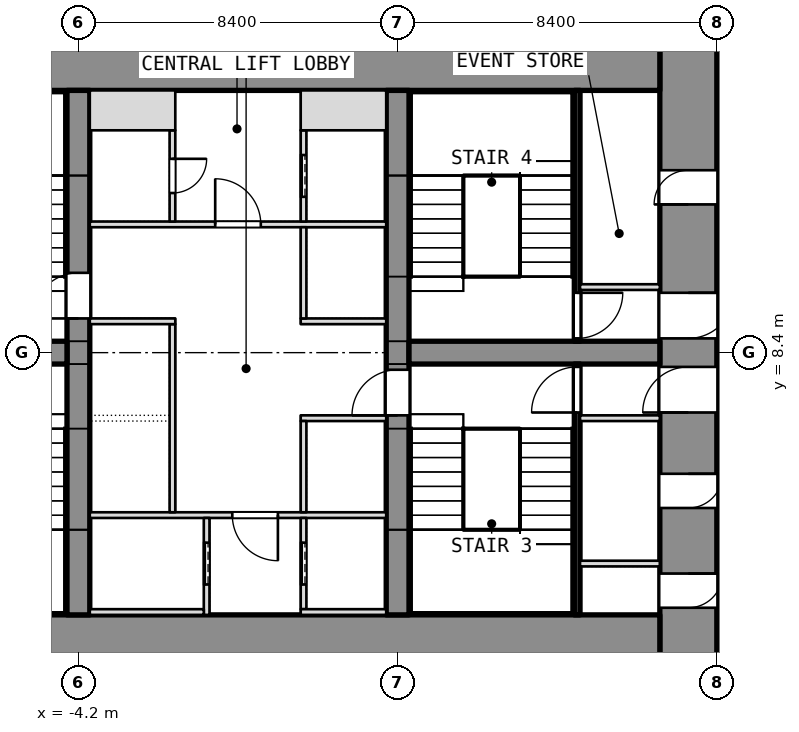
"""IFC4 building model, lengths in metres.
Left out: names, types, materials, properties, quantities, classifications, styles, units other than length and angle.
Written with IfcOpenShell. Run it as: python <this file> out.ifc"""

import sys

from ifc_helpers import new_model, si_unit, direction, frame, frame_2d, origin, place, context, subcontext, project, spatial, rectangle, extrude, element, fill, save


model = new_model("IFC4")
c1 = context("Model", 3, precision=1e-05, world=origin(), true_north=direction((0.0, 1.0)))
c2 = subcontext(c1, "Body", "Model", "MODEL_VIEW")
j1 = project(units=[si_unit("LENGTHUNIT", "METRE"), si_unit("PLANEANGLEUNIT", "RADIAN")], contexts=[c1])
p1 = place(None, origin())
s1 = spatial("IfcSite", under=j1, at=p1, CompositionType="ELEMENT")
p2 = place(p1, origin())
s2 = spatial("IfcBuilding", under=s1, at=p2, CompositionType="ELEMENT")
p3 = place(p2, frame((0.0, 0.0, 26.0)))
s3 = spatial("IfcBuildingStorey", under=s2, at=p3, CompositionType="ELEMENT", Elevation=26.0)
p4 = place(p3, frame((11.85, 0.0, 0.0), z_axis=(0.0, 0.0, 1.0), x_axis=(0.0, 1.0, 0.0)))
e1 = element("IfcWall", 1, at=p4, inside=s3, PredefinedType="SHEAR", context=c2, shape_type="SweptSolid", body=[
    extrude(rectangle(XDim=16.8, YDim=1.5, at=frame_2d((8.4, 0.0))), origin(), (0.0, 0.0, 1.0), 5.0),
])
p5 = place(p4, frame((1.688, 0.0, 0.0)))
e2 = element("IfcOpeningElement", 2, at=p5, cuts=e1, PredefinedType="OPENING", context=c2, shape_type="SweptSolid", body=[
    extrude(rectangle(XDim=0.9, YDim=2.1, at=frame_2d((0.45, 1.05))), frame((0.0, 0.75, 0.0), z_axis=(0.0, -1.0, 0.0), x_axis=(1.0, 0.0, 0.0)), (0.0, 0.0, 1.0), 1.5),
])
p6 = place(p4, frame((4.312, 0.0, 0.0)))
e3 = element("IfcOpeningElement", 3, at=p6, cuts=e1, PredefinedType="OPENING", context=c2, shape_type="SweptSolid", body=[
    extrude(rectangle(XDim=0.9, YDim=2.1, at=frame_2d((0.45, 1.05))), frame((0.0, 0.75, 0.0), z_axis=(0.0, -1.0, 0.0), x_axis=(1.0, 0.0, 0.0)), (0.0, 0.0, 1.0), 1.5),
])
p7 = place(p4, frame((6.825, 0.0, 0.0)))
e4 = element("IfcOpeningElement", 4, at=p7, cuts=e1, PredefinedType="OPENING", context=c2, shape_type="SweptSolid", body=[
    extrude(rectangle(XDim=1.2, YDim=2.1, at=frame_2d((0.6, 1.05))), frame((0.0, 0.75, 0.0), z_axis=(0.0, -1.0, 0.0), x_axis=(1.0, 0.0, 0.0)), (0.0, 0.0, 1.0), 1.5),
])
p8 = place(p4, frame((12.3, 0.0, 0.0)))
e5 = element("IfcOpeningElement", 5, at=p8, cuts=e1, PredefinedType="OPENING", context=c2, shape_type="SweptSolid", body=[
    extrude(rectangle(XDim=0.9, YDim=2.1, at=frame_2d((0.45, 1.05))), frame((0.0, 0.75, 0.0), z_axis=(0.0, -1.0, 0.0), x_axis=(1.0, 0.0, 0.0)), (0.0, 0.0, 1.0), 1.5),
])
p9 = place(p4, frame((8.775, 0.0, 0.0)))
e6 = element("IfcOpeningElement", 6, at=p9, cuts=e1, PredefinedType="OPENING", context=c2, shape_type="SweptSolid", body=[
    extrude(rectangle(XDim=1.2, YDim=2.1, at=frame_2d((0.6, 1.05))), frame((0.0, 0.75, 0.0), z_axis=(0.0, -1.0, 0.0), x_axis=(1.0, 0.0, 0.0)), (0.0, 0.0, 1.0), 1.5),
])
for number, where, z_axis, x_axis in (
    (7, (-11.1, 0.75, 0.0), (0.0, 0.0, 1.0), (1.0, 0.0, 0.0)),
    (8, (-11.1, 16.05, 0.0), (0.0, 0.0, 1.0), (1.0, 0.0, 0.0)),
):
    element("IfcWall", number, at=place(p3, frame(where, z_axis=z_axis, x_axis=x_axis)), inside=s3, PredefinedType="SHEAR", context=c2, shape_type="SweptSolid", body=[
        extrude(rectangle(XDim=22.2, YDim=1.5, at=frame_2d((11.1, 0.0))), origin(), (0.0, 0.0, 1.0), 5.0),
    ])
p10 = place(p3, frame((-4.2, 1.5, 0.0), z_axis=(0.0, 0.0, 1.0), x_axis=(0.0, 1.0, 0.0)))
e9 = element("IfcWall", 9, at=p10, inside=s3, PredefinedType="SHEAR", context=c2, shape_type="SweptSolid", body=[
    extrude(rectangle(XDim=13.8, YDim=0.6, at=frame_2d((6.9, 0.0))), origin(), (0.0, 0.0, 1.0), 5.0),
])
p11 = place(p10, frame((7.8, 0.0, 0.0)))
e10 = element("IfcOpeningElement", 10, at=p11, cuts=e9, PredefinedType="OPENING", context=c2, shape_type="SweptSolid", body=[
    extrude(rectangle(XDim=1.2, YDim=2.1, at=frame_2d((0.6, 1.05))), frame((0.0, 0.3, 0.0), z_axis=(0.0, -1.0, 0.0), x_axis=(1.0, 0.0, 0.0)), (0.0, 0.0, 1.0), 0.6),
])
p12 = place(p3, frame((4.2, 1.5, 0.0), z_axis=(0.0, 0.0, 1.0), x_axis=(0.0, 1.0, 0.0)))
e11 = element("IfcWall", 11, at=p12, inside=s3, PredefinedType="SHEAR", context=c2, shape_type="SweptSolid", body=[
    extrude(rectangle(XDim=13.8, YDim=0.6, at=frame_2d((6.9, 0.0))), origin(), (0.0, 0.0, 1.0), 5.0),
])
p13 = place(p12, frame((5.25, 0.0, 0.0)))
e12 = element("IfcOpeningElement", 12, at=p13, cuts=e11, PredefinedType="OPENING", context=c2, shape_type="SweptSolid", body=[
    extrude(rectangle(XDim=1.2, YDim=2.1, at=frame_2d((0.6, 1.05))), frame((0.0, 0.3, 0.0), z_axis=(0.0, -1.0, 0.0), x_axis=(1.0, 0.0, 0.0)), (0.0, 0.0, 1.0), 0.6),
])
for number, where, z_axis, x_axis in (
    (13, (-11.1, 8.4, 0.0), (0.0, 0.0, 1.0), (1.0, 0.0, 0.0)),
    (14, (4.5, 8.4, 0.0), (0.0, 0.0, 1.0), (1.0, 0.0, 0.0)),
):
    element("IfcWall", number, at=place(p3, frame(where, z_axis=z_axis, x_axis=x_axis)), inside=s3, PredefinedType="SHEAR", context=c2, shape_type="SweptSolid", body=[
        extrude(rectangle(XDim=6.6, YDim=0.6, at=frame_2d((3.3, 0.0))), origin(), (0.0, 0.0, 1.0), 5.0),
    ])
p14 = place(p3, frame((8.925, 1.5, 0.0), z_axis=(0.0, 0.0, 1.0), x_axis=(0.0, 1.0, 0.0)))
e15 = element("IfcWall", 15, at=p14, inside=s3, PredefinedType="SHEAR", context=c2, shape_type="SweptSolid", body=[
    extrude(rectangle(XDim=6.6, YDim=0.15, at=frame_2d((3.3, 0.0))), origin(), (0.0, 0.0, 1.0), 4.8),
])
p15 = place(p14, frame((5.325, 0.0, 0.0)))
e16 = element("IfcOpeningElement", 16, at=p15, cuts=e15, PredefinedType="OPENING", context=c2, shape_type="SweptSolid", body=[
    extrude(rectangle(XDim=1.2, YDim=2.1, at=frame_2d((0.6, 1.05))), frame((0.0, 0.075, 0.0), z_axis=(0.0, -1.0, 0.0), x_axis=(1.0, 0.0, 0.0)), (0.0, 0.0, 1.0), 0.15),
])
for number, where, z_axis, x_axis in (
    (17, (9.0, 6.675, 0.0), (0.0, 0.0, 1.0), (1.0, 0.0, 0.0)),
    (18, (9.0, 2.85, 0.0), (0.0, 0.0, 1.0), (1.0, 0.0, 0.0)),
):
    element("IfcWall", number, at=place(p3, frame(where, z_axis=z_axis, x_axis=x_axis)), inside=s3, PredefinedType="PARTITIONING", context=c2, shape_type="SweptSolid", body=[
        extrude(rectangle(XDim=2.1, YDim=0.15, at=frame_2d((1.05, 0.0))), origin(), (0.0, 0.0, 1.0), 4.8),
    ])
p16 = place(p3, frame((8.925, 8.7, 0.0), z_axis=(0.0, 0.0, 1.0), x_axis=(0.0, 1.0, 0.0)))
e19 = element("IfcWall", 19, at=p16, inside=s3, PredefinedType="SHEAR", context=c2, shape_type="SweptSolid", body=[
    extrude(rectangle(XDim=6.6, YDim=0.15, at=frame_2d((3.3, 0.0))), origin(), (0.0, 0.0, 1.0), 4.8),
])
p17 = place(p16, frame((0.075, 0.0, 0.0)))
e20 = element("IfcOpeningElement", 20, at=p17, cuts=e19, PredefinedType="OPENING", context=c2, shape_type="SweptSolid", body=[
    extrude(rectangle(XDim=1.2, YDim=2.1, at=frame_2d((0.6, 1.05))), frame((0.0, 0.075, 0.0), z_axis=(0.0, -1.0, 0.0), x_axis=(1.0, 0.0, 0.0)), (0.0, 0.0, 1.0), 0.15),
])
p18 = place(p3, frame((9.0, 10.125, 0.0), z_axis=(0.0, 0.0, 1.0), x_axis=(1.0, 0.0, 0.0)))
e21 = element("IfcWall", 21, at=p18, inside=s3, PredefinedType="PARTITIONING", context=c2, shape_type="SweptSolid", body=[
    extrude(rectangle(XDim=2.1, YDim=0.15, at=frame_2d((1.05, 0.0))), origin(), (0.0, 0.0, 1.0), 4.8),
])
p19 = place(p3, frame((-3.9, 4.125, 0.0), z_axis=(0.0, 0.0, 1.0), x_axis=(1.0, 0.0, 0.0)))
e22 = element("IfcWall", 22, at=p19, inside=s3, PredefinedType="PARTITIONING", context=c2, shape_type="SweptSolid", body=[
    extrude(rectangle(XDim=7.8, YDim=0.15, at=frame_2d((3.9, 0.0))), origin(), (0.0, 0.0, 1.0), 4.8),
])
p20 = place(p19, frame((3.75, 0.0, 0.0)))
e23 = element("IfcOpeningElement", 23, at=p20, cuts=e22, PredefinedType="OPENING", context=c2, shape_type="SweptSolid", body=[
    extrude(rectangle(XDim=1.2, YDim=2.1, at=frame_2d((0.6, 1.05))), frame((0.0, 0.075, 0.0), z_axis=(0.0, -1.0, 0.0), x_axis=(1.0, 0.0, 0.0)), (0.0, 0.0, 1.0), 0.15),
])
p21 = place(p3, frame((-3.9, 11.775, 0.0), z_axis=(0.0, 0.0, 1.0), x_axis=(1.0, 0.0, 0.0)))
e24 = element("IfcWall", 24, at=p21, inside=s3, PredefinedType="PARTITIONING", context=c2, shape_type="SweptSolid", body=[
    extrude(rectangle(XDim=7.8, YDim=0.15, at=frame_2d((3.9, 0.0))), origin(), (0.0, 0.0, 1.0), 4.8),
])
p22 = place(p21, frame((3.3, 0.0, 0.0)))
e25 = element("IfcOpeningElement", 25, at=p22, cuts=e24, PredefinedType="OPENING", context=c2, shape_type="SweptSolid", body=[
    extrude(rectangle(XDim=1.2, YDim=2.1, at=frame_2d((0.6, 1.05))), frame((0.0, 0.075, 0.0), z_axis=(0.0, -1.0, 0.0), x_axis=(1.0, 0.0, 0.0)), (0.0, 0.0, 1.0), 0.15),
])
p23 = place(p3, frame((-0.825, 1.5, 0.0), z_axis=(0.0, 0.0, 1.0), x_axis=(0.0, 1.0, 0.0)))
e26 = element("IfcWall", 26, at=p23, inside=s3, PredefinedType="SHEAR", context=c2, shape_type="SweptSolid", body=[
    extrude(rectangle(XDim=2.55, YDim=0.15, at=frame_2d((1.275, 0.0))), origin(), (0.0, 0.0, 1.0), 5.0),
])
p24 = place(p23, frame((0.8, 0.0, 0.0)))
e27 = element("IfcOpeningElement", 27, at=p24, cuts=e26, PredefinedType="OPENING", context=c2, shape_type="SweptSolid", body=[
    extrude(rectangle(XDim=1.1, YDim=2.1, at=frame_2d((0.55, 1.05))), frame((0.0, 0.075, 0.0), z_axis=(0.0, -1.0, 0.0), x_axis=(1.0, 0.0, 0.0)), (0.0, 0.0, 1.0), 0.15),
])
p25 = place(p3, frame((-3.9, 1.575, 0.0), z_axis=(0.0, 0.0, 1.0), x_axis=(1.0, 0.0, 0.0)))
e28 = element("IfcWall", 28, at=p25, inside=s3, PredefinedType="SHEAR", context=c2, shape_type="SweptSolid", body=[
    extrude(rectangle(XDim=3.0, YDim=0.15, at=frame_2d((1.5, 0.0))), origin(), (0.0, 0.0, 1.0), 5.0),
])
p26 = place(p3, frame((-1.725, 4.2, 0.0), z_axis=(0.0, 0.0, 1.0), x_axis=(0.0, 1.0, 0.0)))
e29 = element("IfcWall", 29, at=p26, inside=s3, PredefinedType="SHEAR", context=c2, shape_type="SweptSolid", body=[
    extrude(rectangle(XDim=4.95, YDim=0.15, at=frame_2d((2.475, 0.0))), origin(), (0.0, 0.0, 1.0), 5.0),
])
p27 = place(p3, frame((-3.9, 9.225, 0.0), z_axis=(0.0, 0.0, 1.0), x_axis=(1.0, 0.0, 0.0)))
e30 = element("IfcWall", 30, at=p27, inside=s3, PredefinedType="SHEAR", context=c2, shape_type="SweptSolid", body=[
    extrude(rectangle(XDim=2.25, YDim=0.15, at=frame_2d((1.125, 0.0))), origin(), (0.0, 0.0, 1.0), 5.0),
])
p28 = place(p3, frame((-1.725, 11.85, 0.0), z_axis=(0.0, 0.0, 1.0), x_axis=(0.0, 1.0, 0.0)))
e31 = element("IfcWall", 31, at=p28, inside=s3, PredefinedType="PARTITIONING", context=c2, shape_type="SweptSolid", body=[
    extrude(rectangle(XDim=2.4, YDim=0.15, at=frame_2d((1.2, 0.0))), origin(), (0.0, 0.0, 1.0), 4.8),
])
p29 = place(p28, frame((0.75, 0.0, 0.0)))
e32 = element("IfcOpeningElement", 32, at=p29, cuts=e31, PredefinedType="OPENING", context=c2, shape_type="SweptSolid", body=[
    extrude(rectangle(XDim=0.9, YDim=2.1, at=frame_2d((0.45, 1.05))), frame((0.0, 0.075, 0.0), z_axis=(0.0, -1.0, 0.0), x_axis=(1.0, 0.0, 0.0)), (0.0, 0.0, 1.0), 0.15),
])
p30 = place(p3, frame((-3.9, 14.775, 0.0), z_axis=(0.0, 0.0, 1.0), x_axis=(1.0, 0.0, 0.0)))
e33 = element("IfcWall", 33, at=p30, inside=s3, PredefinedType="PARTITIONING", context=c2, shape_type="SweptSolid", body=[
    extrude(rectangle(XDim=2.25, YDim=1.05, at=frame_2d((1.125, 0.0))), origin(), (0.0, 0.0, 1.0), 4.8),
])
p31 = place(p3, frame((1.725, 1.65, 0.0), z_axis=(0.0, 0.0, 1.0), x_axis=(0.0, 1.0, 0.0)))
e34 = element("IfcWall", 34, at=p31, inside=s3, PredefinedType="SHEAR", context=c2, shape_type="SweptSolid", body=[
    extrude(rectangle(XDim=2.4, YDim=0.15, at=frame_2d((1.2, 0.0))), origin(), (0.0, 0.0, 1.0), 5.0),
])
p32 = place(p31, frame((0.65, 0.0, 0.0)))
e35 = element("IfcOpeningElement", 35, at=p32, cuts=e34, PredefinedType="OPENING", context=c2, shape_type="SweptSolid", body=[
    extrude(rectangle(XDim=1.1, YDim=2.1, at=frame_2d((0.55, 1.05))), frame((0.0, 0.075, 0.0), z_axis=(0.0, -1.0, 0.0), x_axis=(1.0, 0.0, 0.0)), (0.0, 0.0, 1.0), 0.15),
])
p33 = place(p3, frame((1.65, 1.575, 0.0), z_axis=(0.0, 0.0, 1.0), x_axis=(1.0, 0.0, 0.0)))
e36 = element("IfcWall", 36, at=p33, inside=s3, PredefinedType="SHEAR", context=c2, shape_type="SweptSolid", body=[
    extrude(rectangle(XDim=2.25, YDim=0.15, at=frame_2d((1.125, 0.0))), origin(), (0.0, 0.0, 1.0), 5.0),
])
p34 = place(p3, frame((1.725, 11.85, 0.0), z_axis=(0.0, 0.0, 1.0), x_axis=(0.0, 1.0, 0.0)))
e37 = element("IfcWall", 37, at=p34, inside=s3, PredefinedType="SHEAR", context=c2, shape_type="SweptSolid", body=[
    extrude(rectangle(XDim=2.4, YDim=0.15, at=frame_2d((1.2, 0.0))), origin(), (0.0, 0.0, 1.0), 5.0),
])
p35 = place(p34, frame((0.65, 0.0, 0.0)))
e38 = element("IfcOpeningElement", 38, at=p35, cuts=e37, PredefinedType="OPENING", context=c2, shape_type="SweptSolid", body=[
    extrude(rectangle(XDim=1.1, YDim=2.1, at=frame_2d((0.55, 1.05))), frame((0.0, 0.075, 0.0), z_axis=(0.0, -1.0, 0.0), x_axis=(1.0, 0.0, 0.0)), (0.0, 0.0, 1.0), 0.15),
])
p36 = place(p3, frame((1.65, 14.775, 0.0), z_axis=(0.0, 0.0, 1.0), x_axis=(1.0, 0.0, 0.0)))
e39 = element("IfcWall", 39, at=p36, inside=s3, PredefinedType="SHEAR", context=c2, shape_type="SweptSolid", body=[
    extrude(rectangle(XDim=2.25, YDim=1.05, at=frame_2d((1.125, 0.0))), origin(), (0.0, 0.0, 1.0), 5.0),
])
for number, where, z_axis, x_axis in (
    (40, (1.65, 6.675, 0.0), (0.0, 0.0, 1.0), (1.0, 0.0, 0.0)),
    (41, (1.65, 9.225, 0.0), (0.0, 0.0, 1.0), (1.0, 0.0, 0.0)),
):
    element("IfcWall", number, at=place(p3, frame(where, z_axis=z_axis, x_axis=x_axis)), inside=s3, PredefinedType="SHEAR", context=c2, shape_type="SweptSolid", body=[
        extrude(rectangle(XDim=2.25, YDim=0.15, at=frame_2d((1.125, 0.0))), origin(), (0.0, 0.0, 1.0), 5.0),
    ])
p37 = place(p3, frame((1.725, 4.2, 0.0), z_axis=(0.0, 0.0, 1.0), x_axis=(0.0, 1.0, 0.0)))
e42 = element("IfcWall", 42, at=p37, inside=s3, PredefinedType="SHEAR", context=c2, shape_type="SweptSolid", body=[
    extrude(rectangle(XDim=2.4, YDim=0.15, at=frame_2d((1.2, 0.0))), origin(), (0.0, 0.0, 1.0), 5.0),
])
p38 = place(p3, frame((1.725, 9.3, 0.0), z_axis=(0.0, 0.0, 1.0), x_axis=(0.0, 1.0, 0.0)))
e43 = element("IfcWall", 43, at=p38, inside=s3, PredefinedType="SHEAR", context=c2, shape_type="SweptSolid", body=[
    extrude(rectangle(XDim=2.4, YDim=0.15, at=frame_2d((1.2, 0.0))), origin(), (0.0, 0.0, 1.0), 5.0),
])
p39 = place(p5, origin())
e44 = element("IfcDoor", 44, at=p39, inside=s3, OperationType="SINGLE_SWING_LEFT", PredefinedType="DOOR", context=c2, shape_type="SweptSolid", body=[
    extrude(rectangle(XDim=0.9, YDim=2.1, at=frame_2d((0.45, 1.05))), frame((0.0, 0.025, 0.0), z_axis=(0.0, -1.0, 0.0), x_axis=(1.0, 0.0, 0.0)), (0.0, 0.0, 1.0), 0.05),
])
fill(e2, e44)
p40 = place(p6, origin())
e45 = element("IfcDoor", 45, at=p40, inside=s3, OperationType="SINGLE_SWING_LEFT", PredefinedType="DOOR", context=c2, shape_type="SweptSolid", body=[
    extrude(rectangle(XDim=0.9, YDim=2.1, at=frame_2d((0.45, 1.05))), frame((0.0, 0.025, 0.0), z_axis=(0.0, -1.0, 0.0), x_axis=(1.0, 0.0, 0.0)), (0.0, 0.0, 1.0), 0.05),
])
fill(e3, e45)
p41 = place(p7, origin())
e46 = element("IfcDoor", 46, at=p41, inside=s3, OperationType="SINGLE_SWING_LEFT", PredefinedType="DOOR", context=c2, shape_type="SweptSolid", body=[
    extrude(rectangle(XDim=1.2, YDim=2.1, at=frame_2d((0.6, 1.05))), frame((0.0, 0.025, 0.0), z_axis=(0.0, -1.0, 0.0), x_axis=(1.0, 0.0, 0.0)), (0.0, 0.0, 1.0), 0.05),
])
fill(e4, e46)
p42 = place(p15, origin())
e47 = element("IfcDoor", 47, at=p42, inside=s3, OperationType="SINGLE_SWING_LEFT", PredefinedType="DOOR", context=c2, shape_type="SweptSolid", body=[
    extrude(rectangle(XDim=1.2, YDim=2.1, at=frame_2d((0.6, 1.05))), frame((0.0, 0.025, 0.0), z_axis=(0.0, -1.0, 0.0), x_axis=(1.0, 0.0, 0.0)), (0.0, 0.0, 1.0), 0.05),
])
fill(e16, e47)
p43 = place(p8, origin())
e48 = element("IfcDoor", 48, at=p43, inside=s3, OperationType="SINGLE_SWING_LEFT", PredefinedType="DOOR", context=c2, shape_type="SweptSolid", body=[
    extrude(rectangle(XDim=0.9, YDim=2.1, at=frame_2d((0.45, 1.05))), frame((0.0, 0.025, 0.0), z_axis=(0.0, -1.0, 0.0), x_axis=(1.0, 0.0, 0.0)), (0.0, 0.0, 1.0), 0.05),
])
fill(e5, e48)
p44 = place(p9, origin())
e49 = element("IfcDoor", 49, at=p44, inside=s3, OperationType="SINGLE_SWING_LEFT", PredefinedType="DOOR", context=c2, shape_type="SweptSolid", body=[
    extrude(rectangle(XDim=1.2, YDim=2.1, at=frame_2d((0.6, 1.05))), frame((0.0, 0.025, 0.0), z_axis=(0.0, -1.0, 0.0), x_axis=(1.0, 0.0, 0.0)), (0.0, 0.0, 1.0), 0.05),
])
fill(e6, e49)
p45 = place(p17, origin())
e50 = element("IfcDoor", 50, at=p45, inside=s3, OperationType="SINGLE_SWING_LEFT", PredefinedType="DOOR", context=c2, shape_type="SweptSolid", body=[
    extrude(rectangle(XDim=1.2, YDim=2.1, at=frame_2d((0.6, 1.05))), frame((0.0, 0.025, 0.0), z_axis=(0.0, -1.0, 0.0), x_axis=(1.0, 0.0, 0.0)), (0.0, 0.0, 1.0), 0.05),
])
fill(e20, e50)
p46 = place(p24, origin())
e51 = element("IfcDoor", 51, at=p46, inside=s3, OperationType="SLIDING_TO_LEFT", PredefinedType="DOOR", context=c2, shape_type="SweptSolid", body=[
    extrude(rectangle(XDim=1.1, YDim=2.1, at=frame_2d((0.55, 1.05))), frame((0.0, 0.025, 0.0), z_axis=(0.0, -1.0, 0.0), x_axis=(1.0, 0.0, 0.0)), (0.0, 0.0, 1.0), 0.05),
])
fill(e27, e51)
p47 = place(p32, origin())
e52 = element("IfcDoor", 52, at=p47, inside=s3, OperationType="SLIDING_TO_LEFT", PredefinedType="DOOR", context=c2, shape_type="SweptSolid", body=[
    extrude(rectangle(XDim=1.1, YDim=2.1, at=frame_2d((0.55, 1.05))), frame((0.0, 0.025, 0.0), z_axis=(0.0, -1.0, 0.0), x_axis=(1.0, 0.0, 0.0)), (0.0, 0.0, 1.0), 0.05),
])
fill(e35, e52)
p48 = place(p35, origin())
e53 = element("IfcDoor", 53, at=p48, inside=s3, OperationType="SLIDING_TO_LEFT", PredefinedType="DOOR", context=c2, shape_type="SweptSolid", body=[
    extrude(rectangle(XDim=1.1, YDim=2.1, at=frame_2d((0.55, 1.05))), frame((0.0, 0.025, 0.0), z_axis=(0.0, -1.0, 0.0), x_axis=(1.0, 0.0, 0.0)), (0.0, 0.0, 1.0), 0.05),
])
fill(e38, e53)
p49 = place(p20, origin())
e54 = element("IfcDoor", 54, at=p49, inside=s3, OperationType="SINGLE_SWING_LEFT", PredefinedType="DOOR", context=c2, shape_type="SweptSolid", body=[
    extrude(rectangle(XDim=1.2, YDim=2.1, at=frame_2d((0.6, 1.05))), frame((0.0, 0.025, 0.0), z_axis=(0.0, -1.0, 0.0), x_axis=(1.0, 0.0, 0.0)), (0.0, 0.0, 1.0), 0.05),
])
fill(e23, e54)
p50 = place(p22, origin())
e55 = element("IfcDoor", 55, at=p50, inside=s3, OperationType="SINGLE_SWING_LEFT", PredefinedType="DOOR", context=c2, shape_type="SweptSolid", body=[
    extrude(rectangle(XDim=1.2, YDim=2.1, at=frame_2d((0.6, 1.05))), frame((0.0, 0.025, 0.0), z_axis=(0.0, -1.0, 0.0), x_axis=(1.0, 0.0, 0.0)), (0.0, 0.0, 1.0), 0.05),
])
fill(e25, e55)
p51 = place(p29, origin())
e56 = element("IfcDoor", 56, at=p51, inside=s3, OperationType="SINGLE_SWING_LEFT", PredefinedType="DOOR", context=c2, shape_type="SweptSolid", body=[
    extrude(rectangle(XDim=0.9, YDim=2.1, at=frame_2d((0.45, 1.05))), frame((0.0, 0.025, 0.0), z_axis=(0.0, -1.0, 0.0), x_axis=(1.0, 0.0, 0.0)), (0.0, 0.0, 1.0), 0.05),
])
fill(e32, e56)
p52 = place(p11, origin())
e57 = element("IfcDoor", 57, at=p52, inside=s3, OperationType="SINGLE_SWING_LEFT", PredefinedType="DOOR", context=c2, shape_type="SweptSolid", body=[
    extrude(rectangle(XDim=1.2, YDim=2.1, at=frame_2d((0.6, 1.05))), frame((0.0, 0.025, 0.0), z_axis=(0.0, -1.0, 0.0), x_axis=(1.0, 0.0, 0.0)), (0.0, 0.0, 1.0), 0.05),
])
fill(e10, e57)
p53 = place(p13, origin())
e58 = element("IfcDoor", 58, at=p53, inside=s3, OperationType="SINGLE_SWING_LEFT", PredefinedType="DOOR", context=c2, shape_type="SweptSolid", body=[
    extrude(rectangle(XDim=1.2, YDim=2.1, at=frame_2d((0.6, 1.05))), frame((0.0, 0.025, 0.0), z_axis=(0.0, -1.0, 0.0), x_axis=(1.0, 0.0, 0.0)), (0.0, 0.0, 1.0), 0.05),
])
fill(e12, e58)
save(model, sys.argv[1])
